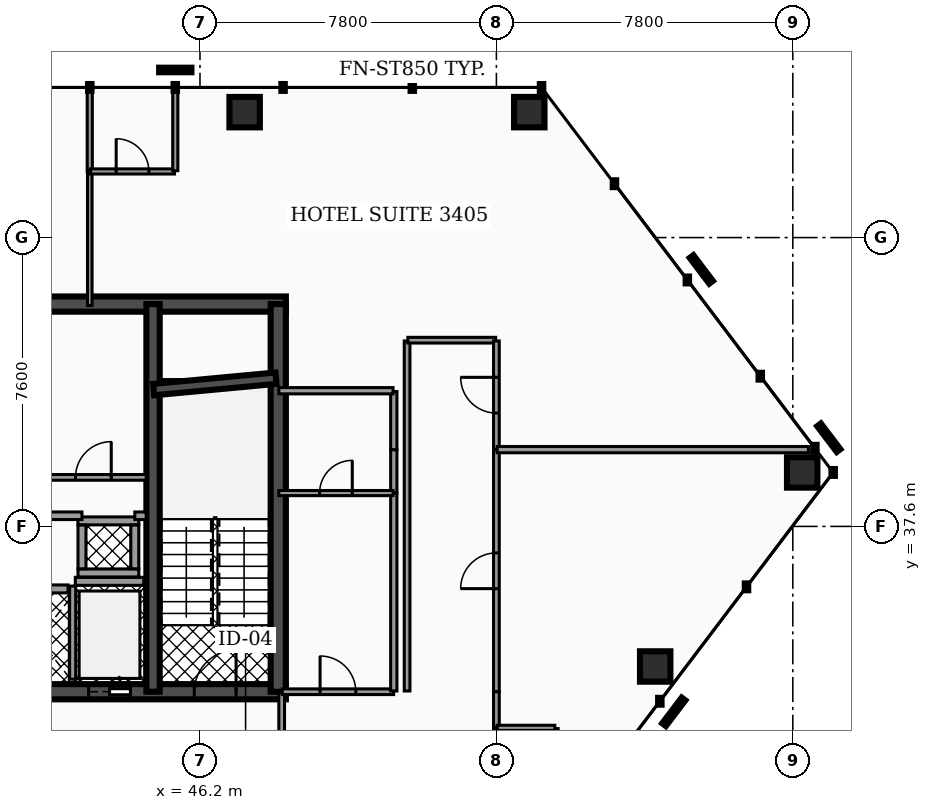
"""IFC4 building model, lengths in metres.
Left out: names, types, materials, properties, quantities, classifications, styles, units other than length and angle.
Written with IfcOpenShell. Run it as: python <this file> out.ifc"""

import sys

from ifc_helpers import new_model, si_unit, direction, frame, frame_2d, origin, origin_2d, place, context, subcontext, project, spatial, rectangle, hollow_rectangle, extrude, element, fill, save


model = new_model("IFC4")
c1 = context("Model", 3, precision=1e-05, world=origin(), true_north=direction((0.0, 1.0)))
c2 = subcontext(c1, "Body", "Model", "MODEL_VIEW")
j1 = project(units=[si_unit("LENGTHUNIT", "METRE"), si_unit("PLANEANGLEUNIT", "RADIAN")], contexts=[c1])
p1 = place(None, origin())
s1 = spatial("IfcSite", under=j1, at=p1, CompositionType="ELEMENT")
p2 = place(p1, origin())
s2 = spatial("IfcBuilding", under=s1, at=p2, CompositionType="ELEMENT")
p3 = place(p2, frame((0.0, 0.0, 142.12)))
s3 = spatial("IfcBuildingStorey", under=s2, at=p3, CompositionType="ELEMENT", Elevation=142.12)
p4 = place(p3, frame((28.4, 43.45, 0.0), z_axis=(0.0, 0.0, 1.0), x_axis=(1.0, 0.0, 0.0)))
e1 = element("IfcWall", 1, at=p4, inside=s3, PredefinedType="SHEAR", context=c2, shape_type="SweptSolid", body=[
    extrude(rectangle(XDim=20.06, YDim=0.4, at=frame_2d((10.03, 0.0))), origin(), (0.0, 0.0, 1.0), 3.5),
])
p5 = place(p3, frame((28.4, 33.25, 0.0), z_axis=(0.0, 0.0, 1.0), x_axis=(1.0, 0.0, 0.0)))
e2 = element("IfcWall", 2, at=p5, inside=s3, PredefinedType="SHEAR", context=c2, shape_type="SweptSolid", body=[
    extrude(rectangle(XDim=20.06, YDim=0.4, at=frame_2d((10.03, 0.0))), origin(), (0.0, 0.0, 1.0), 3.5),
])
p6 = place(p5, frame((4.03, 0.0, 0.0)))
e3 = element("IfcOpeningElement", 3, at=p6, cuts=e2, PredefinedType="OPENING", context=c2, shape_type="SweptSolid", body=[
    extrude(rectangle(XDim=1.1, YDim=2.15, at=frame_2d((0.55, 1.075))), frame((0.0, 0.21, 0.0), z_axis=(0.0, -1.0, 0.0), x_axis=(1.0, 0.0, 0.0)), (0.0, 0.0, 1.0), 0.42),
])
p7 = place(p5, frame((14.87, 0.0, 0.0)))
e4 = element("IfcOpeningElement", 4, at=p7, cuts=e2, PredefinedType="OPENING", context=c2, shape_type="SweptSolid", body=[
    extrude(rectangle(XDim=1.1, YDim=2.15, at=frame_2d((0.55, 1.075))), frame((0.0, 0.21, 0.0), z_axis=(0.0, -1.0, 0.0), x_axis=(1.0, 0.0, 0.0)), (0.0, 0.0, 1.0), 0.42),
])
p8 = place(p5, frame((5.95, 0.0, 0.0)))
e5 = element("IfcOpeningElement", 5, at=p8, cuts=e2, PredefinedType="OPENING", context=c2, shape_type="SweptSolid", body=[
    extrude(rectangle(XDim=1.0, YDim=2.1, at=frame_2d((0.5, 1.05))), frame((0.0, 0.21, 0.0), z_axis=(0.0, -1.0, 0.0), x_axis=(1.0, 0.0, 0.0)), (0.0, 0.0, 1.0), 0.42),
])
p9 = place(p5, frame((7.65, 0.0, 0.0)))
e6 = element("IfcOpeningElement", 6, at=p9, cuts=e2, PredefinedType="OPENING", context=c2, shape_type="SweptSolid", body=[
    extrude(rectangle(XDim=1.0, YDim=2.1, at=frame_2d((0.5, 1.05))), frame((0.0, 0.21, 0.0), z_axis=(0.0, -1.0, 0.0), x_axis=(1.0, 0.0, 0.0)), (0.0, 0.0, 1.0), 0.42),
])
p10 = place(p5, frame((1.31, 0.0, 0.0)))
e7 = element("IfcOpeningElement", 7, at=p10, cuts=e2, PredefinedType="OPENING", context=c2, shape_type="SweptSolid", body=[
    extrude(rectangle(XDim=1.1, YDim=2.2, at=frame_2d((0.55, 1.1))), frame((0.0, 0.21, 0.0), z_axis=(0.0, -1.0, 0.0), x_axis=(1.0, 0.0, 0.0)), (0.0, 0.0, 1.0), 0.42),
])
p11 = place(p5, frame((9.44, 0.0, 0.0)))
e8 = element("IfcOpeningElement", 8, at=p11, cuts=e2, PredefinedType="OPENING", context=c2, shape_type="SweptSolid", body=[
    extrude(rectangle(XDim=1.12, YDim=2.05, at=frame_2d((0.56, 1.025))), frame((0.0, 0.21, 0.0), z_axis=(0.0, -1.0, 0.0), x_axis=(1.0, 0.0, 0.0)), (0.0, 0.0, 1.0), 0.42),
])
p12 = place(p5, frame((17.65, 0.0, 0.0)))
e9 = element("IfcOpeningElement", 9, at=p12, cuts=e2, PredefinedType="OPENING", context=c2, shape_type="SweptSolid", body=[
    extrude(rectangle(XDim=1.1, YDim=2.2, at=frame_2d((0.55, 1.1))), frame((0.0, 0.21, 0.0), z_axis=(0.0, -1.0, 0.0), x_axis=(1.0, 0.0, 0.0)), (0.0, 0.0, 1.0), 0.42),
])
p13 = place(p3, frame((44.965, 33.25, 0.0), z_axis=(0.0, 0.0, 1.0), x_axis=(0.0, 1.0, 0.0)))
e10 = element("IfcWall", 10, at=p13, inside=s3, PredefinedType="SHEAR", context=c2, shape_type="SweptSolid", body=[
    extrude(rectangle(XDim=10.2, YDim=0.35, at=frame_2d((5.1, 0.0))), origin(), (0.0, 0.0, 1.0), 3.5),
])
p14 = place(p3, frame((48.26, 33.25, 0.0), z_axis=(0.0, 0.0, 1.0), x_axis=(0.0, 1.0, 0.0)))
e11 = element("IfcWall", 11, at=p14, inside=s3, PredefinedType="SHEAR", context=c2, shape_type="SweptSolid", body=[
    extrude(rectangle(XDim=10.2, YDim=0.4, at=frame_2d((5.1, 0.0))), origin(), (0.0, 0.0, 1.0), 3.5),
])
p15 = place(p3, frame((44.98, 41.2, 0.0), z_axis=(0.0, 0.0, 1.0), x_axis=(0.995686468965, 0.09278176286, 0.0)))
e12 = element("IfcWall", 12, at=p15, inside=s3, PredefinedType="SHEAR", context=c2, shape_type="SweptSolid", body=[
    extrude(rectangle(XDim=3.234, YDim=0.3, at=frame_2d((1.617, 0.0))), origin(), (0.0, 0.0, 1.0), 3.5),
])
p16 = place(p3, frame((54.865, 48.5, 0.0), z_axis=(0.126009557122, -0.033058489739, 0.991478052087), x_axis=(0.25376154466, 0.967266808307, 0.0)))
e13 = element("IfcColumn", 13, at=p16, inside=s3, PredefinedType="COLUMN", context=c2, shape_type="SweptSolid", body=[
    extrude(hollow_rectangle(XDim=0.8, YDim=0.8, WallThickness=0.04, at=origin_2d()), origin(), (0.0, 0.0, 1.0), 3.53),
])
p17 = place(p3, frame((47.375, 48.5, 0.0), z_axis=(0.059431986446, -0.033265210212, 0.997677936399), x_axis=(0.488416672205, 0.872610539881, 0.0)))
e14 = element("IfcColumn", 14, at=p17, inside=s3, PredefinedType="COLUMN", context=c2, shape_type="SweptSolid", body=[
    extrude(hollow_rectangle(XDim=0.8, YDim=0.8, WallThickness=0.04, at=origin_2d()), origin(), (0.0, 0.0, 1.0), 3.508),
])
p18 = place(p3, frame((58.178, 33.914, 0.0), z_axis=(-0.008972958808, 0.074496425455, 0.99718091067), x_axis=(-0.992824103991, -0.119583855663, 0.0)))
e15 = element("IfcColumn", 15, at=p18, inside=s3, PredefinedType="COLUMN", context=c2, shape_type="SweptSolid", body=[
    extrude(hollow_rectangle(XDim=0.8, YDim=0.8, WallThickness=0.04, at=origin_2d()), origin(), (0.0, 0.0, 1.0), 3.51),
])
p19 = place(p3, frame((62.047, 39.02, 0.0), z_axis=(0.018023393121, 0.109873377298, 0.993782168416), x_axis=(-0.986811366095, 0.161874419675, 0.0)))
e16 = element("IfcColumn", 16, at=p19, inside=s3, PredefinedType="COLUMN", context=c2, shape_type="SweptSolid", body=[
    extrude(hollow_rectangle(XDim=0.8, YDim=0.8, WallThickness=0.04, at=origin_2d()), origin(), (0.0, 0.0, 1.0), 3.522),
])
p20 = place(p3, frame((42.92, 36.155, 0.0), z_axis=(0.0, 0.0, 1.0), x_axis=(1.0, 0.0, 0.0)))
e17 = element("IfcWall", 17, at=p20, inside=s3, PredefinedType="SOLIDWALL", context=c2, shape_type="SweptSolid", body=[
    extrude(rectangle(XDim=1.8, YDim=0.21, at=frame_2d((0.9, 0.0))), origin(), (0.0, 0.0, 1.0), 2.472),
])
p21 = place(p3, frame((42.85, 33.58, 0.0), z_axis=(0.0, 0.0, 1.0), x_axis=(0.0, 1.0, 0.0)))
e18 = element("IfcWall", 18, at=p21, inside=s3, PredefinedType="SOLIDWALL", context=c2, shape_type="SweptSolid", body=[
    extrude(rectangle(XDim=2.45, YDim=0.16, at=frame_2d((1.225, 0.0))), origin(), (0.0, 0.0, 1.0), 2.472),
])
p22 = place(p3, frame((41.17, 35.955, 0.0), z_axis=(0.0, 0.0, 1.0), x_axis=(1.0, 0.0, 0.0)))
e19 = element("IfcWall", 19, at=p22, inside=s3, PredefinedType="SOLIDWALL", context=c2, shape_type="SweptSolid", body=[
    extrude(rectangle(XDim=1.56, YDim=0.21, at=frame_2d((0.78, 0.0))), origin(), (0.0, 0.0, 1.0), 2.472),
])
for number, where, z_axis, x_axis in (
    (20, (42.99, 36.375, 0.0), (0.0, 0.0, 1.0), (1.0, 0.0, 0.0)),
    (21, (42.99, 37.745, 0.0), (0.0, 0.0, 1.0), (1.0, 0.0, 0.0)),
):
    element("IfcWall", number, at=place(p3, frame(where, z_axis=z_axis, x_axis=x_axis)), inside=s3, PredefinedType="SOLIDWALL", context=c2, shape_type="SweptSolid", body=[
        extrude(rectangle(XDim=1.6, YDim=0.21, at=frame_2d((0.8, 0.0))), origin(), (0.0, 0.0, 1.0), 3.5),
    ])
for number, where, z_axis, x_axis in (
    (22, (43.095, 36.485, 0.0), (0.0, 0.0, 1.0), (0.0, 1.0, 0.0)),
    (23, (44.485, 36.485, 0.0), (0.0, 0.0, 1.0), (0.0, 1.0, 0.0)),
):
    element("IfcWall", number, at=place(p3, frame(where, z_axis=z_axis, x_axis=x_axis)), inside=s3, PredefinedType="SOLIDWALL", context=c2, shape_type="SweptSolid", body=[
        extrude(rectangle(XDim=1.15, YDim=0.21, at=frame_2d((0.575, 0.0))), origin(), (0.0, 0.0, 1.0), 3.5),
    ])
p23 = place(p3, frame((42.005, 38.89, 0.0), z_axis=(0.0, 0.0, 1.0), x_axis=(1.0, 0.0, 0.0)))
e24 = element("IfcWall", 24, at=p23, inside=s3, PredefinedType="PARTITIONING", context=c2, shape_type="SweptSolid", body=[
    extrude(rectangle(XDim=2.78, YDim=0.15, at=frame_2d((1.39, 0.0))), origin(), (0.0, 0.0, 1.0), 2.457),
])
p24 = place(p23, frame((0.92, 0.0, 0.0)))
e25 = element("IfcOpeningElement", 25, at=p24, cuts=e24, PredefinedType="OPENING", context=c2, shape_type="SweptSolid", body=[
    extrude(rectangle(XDim=0.94, YDim=2.05, at=frame_2d((0.47, 1.025))), frame((0.0, 0.085, 0.0), z_axis=(0.0, -1.0, 0.0), x_axis=(1.0, 0.0, 0.0)), (0.0, 0.0, 1.0), 0.17),
])
p25 = place(p3, frame((39.27, 37.88, 0.0), z_axis=(0.0, 0.0, 1.0), x_axis=(1.0, 0.0, 0.0)))
e26 = element("IfcWall", 26, at=p25, inside=s3, PredefinedType="PARTITIONING", context=c2, shape_type="SweptSolid", body=[
    extrude(rectangle(XDim=3.825, YDim=0.2, at=frame_2d((1.913, 0.0))), origin(), (0.0, 0.0, 1.0), 2.457),
])
p26 = place(p3, frame((44.485, 37.88, 0.0), z_axis=(0.0, 0.0, 1.0), x_axis=(1.0, 0.0, 0.0)))
e27 = element("IfcWall", 27, at=p26, inside=s3, PredefinedType="PARTITIONING", context=c2, shape_type="SweptSolid", body=[
    extrude(rectangle(XDim=0.3, YDim=0.2, at=frame_2d((0.15, 0.0))), origin(), (0.0, 0.0, 1.0), 2.457),
])
p27 = place(p3, frame((48.35, 30.17, 0.0), z_axis=(0.0, 0.0, 1.0), x_axis=(0.0, 1.0, 0.0)))
e28 = element("IfcWall", 28, at=p27, inside=s3, PredefinedType="PARTITIONING", context=c2, shape_type="SweptSolid", body=[
    extrude(rectangle(XDim=3.06, YDim=0.15, at=frame_2d((1.53, 0.0))), origin(), (0.0, 0.0, 1.0), 2.457),
])
p28 = place(p27, frame((1.06, 0.0, 0.0)))
e29 = element("IfcOpeningElement", 29, at=p28, cuts=e28, PredefinedType="OPENING", context=c2, shape_type="SweptSolid", body=[
    extrude(rectangle(XDim=0.94, YDim=2.05, at=frame_2d((0.47, 1.025))), frame((0.0, 0.085, 0.0), z_axis=(0.0, -1.0, 0.0), x_axis=(1.0, 0.0, 0.0)), (0.0, 0.0, 1.0), 0.17),
])
p29 = place(p3, frame((54.0, 33.25, 0.0), z_axis=(0.0, 0.0, 1.0), x_axis=(0.0, 1.0, 0.0)))
e30 = element("IfcWall", 30, at=p29, inside=s3, PredefinedType="PARTITIONING", context=c2, shape_type="SweptSolid", body=[
    extrude(rectangle(XDim=6.365, YDim=0.15, at=frame_2d((3.183, 0.0))), origin(), (0.0, 0.0, 1.0), 2.457),
])
p30 = place(p29, frame((2.712, 0.0, 0.0)))
e31 = element("IfcOpeningElement", 31, at=p30, cuts=e30, PredefinedType="OPENING", context=c2, shape_type="SweptSolid", body=[
    extrude(rectangle(XDim=0.94, YDim=2.05, at=frame_2d((0.47, 1.025))), frame((0.0, 0.085, 0.0), z_axis=(0.0, -1.0, 0.0), x_axis=(1.0, 0.0, 0.0)), (0.0, 0.0, 1.0), 0.17),
])
p31 = place(p3, frame((54.0, 32.305, 0.0), z_axis=(0.0, 0.0, 1.0), x_axis=(0.0, 1.0, 0.0)))
e32 = element("IfcWall", 32, at=p31, inside=s3, PredefinedType="PARTITIONING", context=c2, shape_type="SweptSolid", body=[
    extrude(rectangle(XDim=0.945, YDim=0.15, at=frame_2d((0.473, 0.0))), origin(), (0.0, 0.0, 1.0), 2.457),
])
p32 = place(p3, frame((54.0, 31.085, 0.0), z_axis=(0.0, 0.0, 1.0), x_axis=(0.0, 1.0, 0.0)))
e33 = element("IfcWall", 33, at=p32, inside=s3, PredefinedType="PARTITIONING", context=c2, shape_type="SweptSolid", body=[
    extrude(rectangle(XDim=1.21, YDim=0.15, at=frame_2d((0.605, 0.0))), origin(), (0.0, 0.0, 1.0), 2.457),
])
p33 = place(p3, frame((51.65, 33.27, 0.0), z_axis=(0.0, 0.0, 1.0), x_axis=(0.0, 1.0, 0.0)))
e34 = element("IfcWall", 34, at=p33, inside=s3, PredefinedType="PARTITIONING", context=c2, shape_type="SweptSolid", body=[
    extrude(rectangle(XDim=9.21, YDim=0.15, at=frame_2d((4.605, 0.0))), origin(), (0.0, 0.0, 1.0), 2.457),
])
p34 = place(p3, frame((51.67, 42.5, 0.0), z_axis=(0.0, 0.0, 1.0), x_axis=(1.0, 0.0, 0.0)))
e35 = element("IfcWall", 35, at=p34, inside=s3, PredefinedType="PARTITIONING", context=c2, shape_type="SweptSolid", body=[
    extrude(rectangle(XDim=2.31, YDim=0.15, at=frame_2d((1.155, 0.0))), origin(), (0.0, 0.0, 1.0), 2.457),
])
p35 = place(p3, frame((54.0, 39.625, 0.0), z_axis=(0.0, 0.0, 1.0), x_axis=(0.0, 1.0, 0.0)))
e36 = element("IfcWall", 36, at=p35, inside=s3, PredefinedType="PARTITIONING", context=c2, shape_type="SweptSolid", body=[
    extrude(rectangle(XDim=2.855, YDim=0.15, at=frame_2d((1.427, 0.0))), origin(), (0.0, 0.0, 1.0), 2.457),
])
p36 = place(p35, frame((0.958, 0.0, 0.0)))
e37 = element("IfcOpeningElement", 37, at=p36, cuts=e36, PredefinedType="OPENING", context=c2, shape_type="SweptSolid", body=[
    extrude(rectangle(XDim=0.94, YDim=2.05, at=frame_2d((0.47, 1.025))), frame((0.0, 0.085, 0.0), z_axis=(0.0, -1.0, 0.0), x_axis=(1.0, 0.0, 0.0)), (0.0, 0.0, 1.0), 0.17),
])
p37 = place(p3, frame((48.365, 33.25, 0.0), z_axis=(0.0, 0.0, 1.0), x_axis=(1.0, 0.0, 0.0)))
e38 = element("IfcWall", 38, at=p37, inside=s3, PredefinedType="PARTITIONING", context=c2, shape_type="SweptSolid", body=[
    extrude(rectangle(XDim=2.93, YDim=0.15, at=frame_2d((1.465, 0.0))), origin(), (0.0, 0.0, 1.0), 2.457),
])
p38 = place(p37, frame((0.995, 0.0, 0.0)))
e39 = element("IfcOpeningElement", 39, at=p38, cuts=e38, PredefinedType="OPENING", context=c2, shape_type="SweptSolid", body=[
    extrude(rectangle(XDim=0.94, YDim=2.05, at=frame_2d((0.47, 1.025))), frame((0.0, 0.085, 0.0), z_axis=(0.0, -1.0, 0.0), x_axis=(1.0, 0.0, 0.0)), (0.0, 0.0, 1.0), 0.17),
])
p39 = place(p3, frame((43.3, 43.415, 0.0), z_axis=(0.0, 0.0, 1.0), x_axis=(0.0, 1.0, 0.0)))
e40 = element("IfcWall", 40, at=p39, inside=s3, PredefinedType="PARTITIONING", context=c2, shape_type="SweptSolid", body=[
    extrude(rectangle(XDim=3.52, YDim=0.12, at=frame_2d((1.76, 0.0))), origin(), (0.0, 0.0, 1.0), 2.457),
])
p40 = place(p3, frame((43.3, 46.945, 0.0), z_axis=(0.0, 0.0, 1.0), x_axis=(0.0, 1.0, 0.0)))
e41 = element("IfcWall", 41, at=p40, inside=s3, PredefinedType="PARTITIONING", context=c2, shape_type="SweptSolid", body=[
    extrude(rectangle(XDim=2.19, YDim=0.135, at=frame_2d((1.095, 0.0))), origin(), (0.0, 0.0, 1.0), 2.457),
])
p41 = place(p3, frame((55.557, 30.17, 0.0), z_axis=(0.0, 0.0, 1.0), x_axis=(0.0, 1.0, 0.0)))
e42 = element("IfcWall", 42, at=p41, inside=s3, PredefinedType="PARTITIONING", context=c2, shape_type="SweptSolid", body=[
    extrude(rectangle(XDim=2.11, YDim=0.135, at=frame_2d((1.055, 0.0))), origin(), (0.0, 0.0, 1.0), 2.457),
])
p42 = place(p41, frame((0.625, 0.0, 0.0)))
e43 = element("IfcOpeningElement", 43, at=p42, cuts=e42, PredefinedType="OPENING", context=c2, shape_type="SweptSolid", body=[
    extrude(rectangle(XDim=0.86, YDim=2.05, at=frame_2d((0.43, 1.025))), frame((0.0, 0.077, 0.0), z_axis=(0.0, -1.0, 0.0), x_axis=(1.0, 0.0, 0.0)), (0.0, 0.0, 1.0), 0.155),
])
p43 = place(p3, frame((54.02, 32.3, 0.0), z_axis=(0.0, 0.0, 1.0), x_axis=(1.0, 0.0, 0.0)))
e44 = element("IfcWall", 44, at=p43, inside=s3, PredefinedType="PARTITIONING", context=c2, shape_type="SweptSolid", body=[
    extrude(rectangle(XDim=1.517, YDim=0.135, at=frame_2d((0.759, 0.0))), origin(), (0.0, 0.0, 1.0), 2.457),
])
p44 = place(p3, frame((54.02, 39.62, 0.0), z_axis=(0.0, 0.0, 1.0), x_axis=(1.0, 0.0, 0.0)))
e45 = element("IfcWall", 45, at=p44, inside=s3, PredefinedType="PARTITIONING", context=c2, shape_type="SweptSolid", body=[
    extrude(rectangle(XDim=8.191, YDim=0.165, at=frame_2d((4.095, 0.0))), origin(), (0.0, 0.0, 1.0), 2.457),
])
p45 = place(p3, frame((43.32, 46.94, 0.0), z_axis=(0.0, 0.0, 1.0), x_axis=(1.0, 0.0, 0.0)))
e46 = element("IfcWall", 46, at=p45, inside=s3, PredefinedType="PARTITIONING", context=c2, shape_type="SweptSolid", body=[
    extrude(rectangle(XDim=2.21, YDim=0.135, at=frame_2d((1.105, 0.0))), origin(), (0.0, 0.0, 1.0), 2.457),
])
p46 = place(p45, frame((0.675, 0.0, 0.0)))
e47 = element("IfcOpeningElement", 47, at=p46, cuts=e46, PredefinedType="OPENING", context=c2, shape_type="SweptSolid", body=[
    extrude(rectangle(XDim=0.86, YDim=2.05, at=frame_2d((0.43, 1.025))), frame((0.0, 0.077, 0.0), z_axis=(0.0, -1.0, 0.0), x_axis=(1.0, 0.0, 0.0)), (0.0, 0.0, 1.0), 0.155),
])
p47 = place(p3, frame((45.55, 46.96, 0.0), z_axis=(0.0, 0.0, 1.0), x_axis=(0.0, 1.0, 0.0)))
e48 = element("IfcWall", 48, at=p47, inside=s3, PredefinedType="PARTITIONING", context=c2, shape_type="SweptSolid", body=[
    extrude(rectangle(XDim=2.175, YDim=0.135, at=frame_2d((1.087, 0.0))), origin(), (0.0, 0.0, 1.0), 2.457),
])
p48 = place(p3, frame((51.3, 33.27, 0.0), z_axis=(0.0, 0.0, 1.0), x_axis=(0.0, 1.0, 0.0)))
e49 = element("IfcWall", 49, at=p48, inside=s3, PredefinedType="PARTITIONING", context=c2, shape_type="SweptSolid", body=[
    extrude(rectangle(XDim=5.202, YDim=0.165, at=frame_2d((2.601, 0.0))), origin(), (0.0, 0.0, 1.0), 2.457),
])
p49 = place(p3, frame((51.3, 38.482, 0.0), z_axis=(0.0, 0.0, 1.0), x_axis=(0.0, 1.0, 0.0)))
e50 = element("IfcWall", 50, at=p49, inside=s3, PredefinedType="PARTITIONING", context=c2, shape_type="SweptSolid", body=[
    extrude(rectangle(XDim=1.138, YDim=0.165, at=frame_2d((0.569, 0.0))), origin(), (0.0, 0.0, 1.0), 2.457),
])
p50 = place(p3, frame((51.3, 39.62, 0.0), z_axis=(0.0, 0.0, 1.0), x_axis=(0.0, 1.0, 0.0)))
e51 = element("IfcWall", 51, at=p50, inside=s3, PredefinedType="PARTITIONING", context=c2, shape_type="SweptSolid", body=[
    extrude(rectangle(XDim=1.53, YDim=0.165, at=frame_2d((0.765, 0.0))), origin(), (0.0, 0.0, 1.0), 2.457),
])
p51 = place(p3, frame((48.275, 41.17, 0.0), z_axis=(0.0, 0.0, 1.0), x_axis=(1.0, 0.0, 0.0)))
e52 = element("IfcWall", 52, at=p51, inside=s3, PredefinedType="PARTITIONING", context=c2, shape_type="SweptSolid", body=[
    extrude(rectangle(XDim=3.005, YDim=0.165, at=frame_2d((1.502, 0.0))), origin(), (0.0, 0.0, 1.0), 2.457),
])
p52 = place(p3, frame((48.275, 38.477, 0.0), z_axis=(0.0, 0.0, 1.0), x_axis=(1.0, 0.0, 0.0)))
e53 = element("IfcWall", 53, at=p52, inside=s3, PredefinedType="PARTITIONING", context=c2, shape_type="SweptSolid", body=[
    extrude(rectangle(XDim=3.005, YDim=0.135, at=frame_2d((1.502, 0.0))), origin(), (0.0, 0.0, 1.0), 2.457),
])
p53 = place(p52, frame((1.073, 0.0, 0.0)))
e54 = element("IfcOpeningElement", 54, at=p53, cuts=e53, PredefinedType="OPENING", context=c2, shape_type="SweptSolid", body=[
    extrude(rectangle(XDim=0.86, YDim=2.05, at=frame_2d((0.43, 1.025))), frame((0.0, 0.077, 0.0), z_axis=(0.0, -1.0, 0.0), x_axis=(1.0, 0.0, 0.0)), (0.0, 0.0, 1.0), 0.155),
])
p54 = place(p7, origin())
e55 = element("IfcDoor", 55, at=p54, inside=s3, OperationType="SLIDING_TO_RIGHT", PredefinedType="DOOR", context=c2, shape_type="SweptSolid", body=[
    extrude(rectangle(XDim=1.1, YDim=2.15, at=frame_2d((0.55, 1.075))), frame((0.0, 0.025, 0.0), z_axis=(0.0, -1.0, 0.0), x_axis=(1.0, 0.0, 0.0)), (0.0, 0.0, 1.0), 0.05),
])
fill(e4, e55)
p55 = place(p12, origin())
e56 = element("IfcDoor", 56, at=p55, inside=s3, OperationType="SINGLE_SWING_RIGHT", PredefinedType="DOOR", context=c2, shape_type="SweptSolid", body=[
    extrude(rectangle(XDim=1.1, YDim=2.2, at=frame_2d((0.55, 1.1))), frame((0.0, 0.025, 0.0), z_axis=(0.0, -1.0, 0.0), x_axis=(1.0, 0.0, 0.0)), (0.0, 0.0, 1.0), 0.05),
])
fill(e9, e56)
p56 = place(p24, origin())
e57 = element("IfcDoor", 57, at=p56, inside=s3, OperationType="SINGLE_SWING_RIGHT", PredefinedType="DOOR", context=c2, shape_type="SweptSolid", body=[
    extrude(rectangle(XDim=0.94, YDim=2.05, at=frame_2d((0.47, 1.025))), frame((0.0, 0.025, 0.0), z_axis=(0.0, -1.0, 0.0), x_axis=(1.0, 0.0, 0.0)), (0.0, 0.0, 1.0), 0.05),
])
fill(e25, e57)
p57 = place(p30, origin())
e58 = element("IfcDoor", 58, at=p57, inside=s3, OperationType="SINGLE_SWING_LEFT", PredefinedType="DOOR", context=c2, shape_type="SweptSolid", body=[
    extrude(rectangle(XDim=0.94, YDim=2.05, at=frame_2d((0.47, 1.025))), frame((0.0, 0.025, 0.0), z_axis=(0.0, -1.0, 0.0), x_axis=(1.0, 0.0, 0.0)), (0.0, 0.0, 1.0), 0.05),
])
fill(e31, e58)
p58 = place(p36, origin())
e59 = element("IfcDoor", 59, at=p58, inside=s3, OperationType="SINGLE_SWING_RIGHT", PredefinedType="DOOR", context=c2, shape_type="SweptSolid", body=[
    extrude(rectangle(XDim=0.94, YDim=2.05, at=frame_2d((0.47, 1.025))), frame((0.0, 0.025, 0.0), z_axis=(0.0, -1.0, 0.0), x_axis=(1.0, 0.0, 0.0)), (0.0, 0.0, 1.0), 0.05),
])
fill(e37, e59)
p59 = place(p38, origin())
e60 = element("IfcDoor", 60, at=p59, inside=s3, OperationType="SINGLE_SWING_LEFT", PredefinedType="DOOR", context=c2, shape_type="SweptSolid", body=[
    extrude(rectangle(XDim=0.94, YDim=2.05, at=frame_2d((0.47, 1.025))), frame((0.0, 0.025, 0.0), z_axis=(0.0, -1.0, 0.0), x_axis=(1.0, 0.0, 0.0)), (0.0, 0.0, 1.0), 0.05),
])
fill(e39, e60)
p60 = place(p46, origin())
e61 = element("IfcDoor", 61, at=p60, inside=s3, OperationType="SINGLE_SWING_LEFT", PredefinedType="DOOR", context=c2, shape_type="SweptSolid", body=[
    extrude(rectangle(XDim=0.86, YDim=2.05, at=frame_2d((0.43, 1.025))), frame((0.0, 0.025, 0.0), z_axis=(0.0, -1.0, 0.0), x_axis=(1.0, 0.0, 0.0)), (0.0, 0.0, 1.0), 0.05),
])
fill(e47, e61)
p61 = place(p53, origin())
e62 = element("IfcDoor", 62, at=p61, inside=s3, OperationType="SINGLE_SWING_RIGHT", PredefinedType="DOOR", context=c2, shape_type="SweptSolid", body=[
    extrude(rectangle(XDim=0.86, YDim=2.05, at=frame_2d((0.43, 1.025))), frame((0.0, 0.025, 0.0), z_axis=(0.0, -1.0, 0.0), x_axis=(1.0, 0.0, 0.0)), (0.0, 0.0, 1.0), 0.05),
])
fill(e54, e62)
save(model, sys.argv[1])
